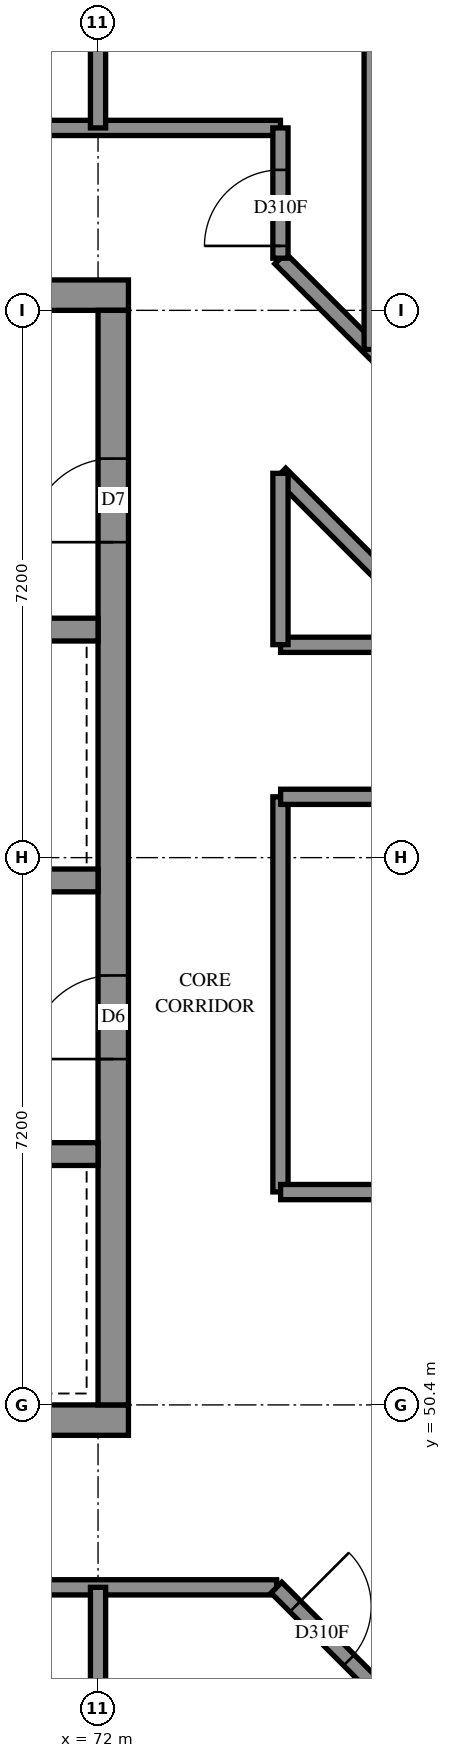
"""IFC4 building model, lengths in metres.
Left out: names, types, materials, properties, quantities, classifications, styles, units other than length and angle.
Written with IfcOpenShell. Run it as: python <this file> out.ifc"""

import sys

from ifc_helpers import new_model, si_unit, direction, frame, frame_2d, origin, place, context, subcontext, project, spatial, rectangle, extrude, element, fill, save


model = new_model("IFC4")
c1 = context("Model", 3, precision=1e-05, world=origin(), true_north=direction((0.0, 1.0)))
c2 = subcontext(c1, "Body", "Model", "MODEL_VIEW")
j1 = project(units=[si_unit("LENGTHUNIT", "METRE"), si_unit("PLANEANGLEUNIT", "RADIAN")], contexts=[c1])
p1 = place(None, origin())
s1 = spatial("IfcSite", under=j1, at=p1, CompositionType="ELEMENT")
p2 = place(p1, origin())
s2 = spatial("IfcBuilding", under=s1, at=p2, CompositionType="ELEMENT")
p3 = place(p2, frame((0.0, 0.0, 260.8)))
s3 = spatial("IfcBuildingStorey", under=s2, at=p3, CompositionType="ELEMENT", Elevation=260.8)
p4 = place(p3, frame((57.2, 50.2, -0.3), z_axis=(0.0, 0.0, 1.0), x_axis=(1.0, 0.0, 0.0)))
e1 = element("IfcWall", 1, at=p4, inside=s3, PredefinedType="SHEAR", context=c2, shape_type="SweptSolid", body=[
    extrude(rectangle(XDim=15.2, YDim=0.4, at=frame_2d((7.6, 0.0))), origin(), (0.0, 0.0, 1.0), 2.7),
])
p5 = place(p3, frame((57.2, 65.0, -0.3), z_axis=(0.0, 0.0, 1.0), x_axis=(1.0, 0.0, 0.0)))
e2 = element("IfcWall", 2, at=p5, inside=s3, PredefinedType="SHEAR", context=c2, shape_type="SweptSolid", body=[
    extrude(rectangle(XDim=15.2, YDim=0.4, at=frame_2d((7.6, 0.0))), origin(), (0.0, 0.0, 1.0), 2.7),
])
p6 = place(p5, frame((10.4, 0.0, 0.3)))
e3 = element("IfcOpeningElement", 3, at=p6, cuts=e2, PredefinedType="OPENING", context=c2, shape_type="SweptSolid", body=[
    extrude(rectangle(XDim=0.8, YDim=2.1, at=frame_2d((0.4, 1.05))), frame((0.0, 0.21, 0.0), z_axis=(0.0, -1.0, 0.0), x_axis=(1.0, 0.0, 0.0)), (0.0, 0.0, 1.0), 0.42),
])
p7 = place(p3, frame((72.2, 50.4, -0.3), z_axis=(0.0, 0.0, 1.0), x_axis=(0.0, 1.0, 0.0)))
e4 = element("IfcWall", 4, at=p7, inside=s3, PredefinedType="SHEAR", context=c2, shape_type="SweptSolid", body=[
    extrude(rectangle(XDim=14.4, YDim=0.4, at=frame_2d((7.2, 0.0))), origin(), (0.0, 0.0, 1.0), 2.7),
])
p8 = place(p7, frame((4.55, 0.0, 0.3)))
e5 = element("IfcOpeningElement", 5, at=p8, cuts=e4, PredefinedType="OPENING", context=c2, shape_type="SweptSolid", body=[
    extrude(rectangle(XDim=1.1, YDim=2.1, at=frame_2d((0.55, 1.05))), frame((0.0, 0.21, 0.0), z_axis=(0.0, -1.0, 0.0), x_axis=(1.0, 0.0, 0.0)), (0.0, 0.0, 1.0), 0.42),
])
p9 = place(p7, frame((11.35, 0.0, 0.3)))
e6 = element("IfcOpeningElement", 6, at=p9, cuts=e4, PredefinedType="OPENING", context=c2, shape_type="SweptSolid", body=[
    extrude(rectangle(XDim=1.1, YDim=2.1, at=frame_2d((0.55, 1.05))), frame((0.0, 0.21, 0.0), z_axis=(0.0, -1.0, 0.0), x_axis=(1.0, 0.0, 0.0)), (0.0, 0.0, 1.0), 0.42),
])
p10 = place(p3, frame((57.6, 53.7, 0.0), z_axis=(0.0, 0.0, 1.0), x_axis=(1.0, 0.0, 0.0)))
e7 = element("IfcWall", 7, at=p10, inside=s3, PredefinedType="SOLIDWALL", context=c2, shape_type="SweptSolid", body=[
    extrude(rectangle(XDim=14.4, YDim=0.3, at=frame_2d((7.2, 0.0))), origin(), (0.0, 0.0, 1.0), 3.1),
])
p11 = place(p10, frame((1.35, 0.0, 0.0)))
e8 = element("IfcOpeningElement", 8, at=p11, cuts=e7, PredefinedType="OPENING", context=c2, shape_type="SweptSolid", body=[
    extrude(rectangle(XDim=0.9, YDim=2.1, at=frame_2d((0.45, 1.05))), frame((0.0, 0.16, 0.0), z_axis=(0.0, -1.0, 0.0), x_axis=(1.0, 0.0, 0.0)), (0.0, 0.0, 1.0), 0.32),
])
p12 = place(p10, frame((4.95, 0.0, 0.0)))
e9 = element("IfcOpeningElement", 9, at=p12, cuts=e7, PredefinedType="OPENING", context=c2, shape_type="SweptSolid", body=[
    extrude(rectangle(XDim=0.9, YDim=2.1, at=frame_2d((0.45, 1.05))), frame((0.0, 0.16, 0.0), z_axis=(0.0, -1.0, 0.0), x_axis=(1.0, 0.0, 0.0)), (0.0, 0.0, 1.0), 0.32),
])
p13 = place(p10, frame((8.55, 0.0, 0.0)))
e10 = element("IfcOpeningElement", 10, at=p13, cuts=e7, PredefinedType="OPENING", context=c2, shape_type="SweptSolid", body=[
    extrude(rectangle(XDim=0.9, YDim=2.1, at=frame_2d((0.45, 1.05))), frame((0.0, 0.16, 0.0), z_axis=(0.0, -1.0, 0.0), x_axis=(1.0, 0.0, 0.0)), (0.0, 0.0, 1.0), 0.32),
])
p14 = place(p10, frame((12.05, 0.0, 0.0)))
e11 = element("IfcOpeningElement", 11, at=p14, cuts=e7, PredefinedType="OPENING", context=c2, shape_type="SweptSolid", body=[
    extrude(rectangle(XDim=1.1, YDim=2.1, at=frame_2d((0.55, 1.05))), frame((0.0, 0.16, 0.0), z_axis=(0.0, -1.0, 0.0), x_axis=(1.0, 0.0, 0.0)), (0.0, 0.0, 1.0), 0.32),
])
p15 = place(p3, frame((57.6, 57.3, 0.0), z_axis=(0.0, 0.0, 1.0), x_axis=(1.0, 0.0, 0.0)))
e12 = element("IfcWall", 12, at=p15, inside=s3, PredefinedType="SOLIDWALL", context=c2, shape_type="SweptSolid", body=[
    extrude(rectangle(XDim=14.4, YDim=0.3, at=frame_2d((7.2, 0.0))), origin(), (0.0, 0.0, 1.0), 3.1),
])
p16 = place(p15, frame((8.55, 0.0, 0.0)))
e13 = element("IfcOpeningElement", 13, at=p16, cuts=e12, PredefinedType="OPENING", context=c2, shape_type="SweptSolid", body=[
    extrude(rectangle(XDim=0.9, YDim=2.1, at=frame_2d((0.45, 1.05))), frame((0.0, 0.16, 0.0), z_axis=(0.0, -1.0, 0.0), x_axis=(1.0, 0.0, 0.0)), (0.0, 0.0, 1.0), 0.32),
])
p17 = place(p15, frame((1.25, 0.0, 0.0)))
e14 = element("IfcOpeningElement", 14, at=p17, cuts=e12, PredefinedType="OPENING", context=c2, shape_type="SweptSolid", body=[
    extrude(rectangle(XDim=1.1, YDim=2.1, at=frame_2d((0.55, 1.05))), frame((0.0, 0.16, 0.0), z_axis=(0.0, -1.0, 0.0), x_axis=(1.0, 0.0, 0.0)), (0.0, 0.0, 1.0), 0.32),
])
p18 = place(p15, frame((4.85, 0.0, 0.0)))
e15 = element("IfcOpeningElement", 15, at=p18, cuts=e12, PredefinedType="OPENING", context=c2, shape_type="SweptSolid", body=[
    extrude(rectangle(XDim=1.1, YDim=2.1, at=frame_2d((0.55, 1.05))), frame((0.0, 0.16, 0.0), z_axis=(0.0, -1.0, 0.0), x_axis=(1.0, 0.0, 0.0)), (0.0, 0.0, 1.0), 0.32),
])
p19 = place(p15, frame((12.05, 0.0, 0.0)))
e16 = element("IfcOpeningElement", 16, at=p19, cuts=e12, PredefinedType="OPENING", context=c2, shape_type="SweptSolid", body=[
    extrude(rectangle(XDim=1.1, YDim=2.1, at=frame_2d((0.55, 1.05))), frame((0.0, 0.16, 0.0), z_axis=(0.0, -1.0, 0.0), x_axis=(1.0, 0.0, 0.0)), (0.0, 0.0, 1.0), 0.32),
])
p20 = place(p3, frame((64.8, 60.6, 0.0), z_axis=(0.0, 0.0, 1.0), x_axis=(1.0, 0.0, 0.0)))
e17 = element("IfcWall", 17, at=p20, inside=s3, PredefinedType="SOLIDWALL", context=c2, shape_type="SweptSolid", body=[
    extrude(rectangle(XDim=7.2, YDim=0.3, at=frame_2d((3.6, 0.0))), origin(), (0.0, 0.0, 1.0), 3.1),
])
p21 = place(p3, frame((55.2, 67.2, 0.0), z_axis=(0.0, 0.0, 1.0), x_axis=(1.0, 0.0, 0.0)))
e18 = element("IfcWall", 18, at=p21, inside=s3, PredefinedType="PARTITIONING", context=c2, shape_type="SweptSolid", body=[
    extrude(rectangle(XDim=19.2, YDim=0.2, at=frame_2d((9.6, 0.0))), origin(), (0.0, 0.0, 1.0), 3.1),
])
p22 = place(p21, frame((4.475, 0.0, 0.0)))
e19 = element("IfcOpeningElement", 19, at=p22, cuts=e18, PredefinedType="OPENING", context=c2, shape_type="SweptSolid", body=[
    extrude(rectangle(XDim=1.0, YDim=2.1, at=frame_2d((0.5, 1.05))), frame((0.0, 0.11, 0.0), z_axis=(0.0, -1.0, 0.0), x_axis=(1.0, 0.0, 0.0)), (0.0, 0.0, 1.0), 0.22),
])
p23 = place(p21, frame((8.301, 0.0, 0.0)))
e20 = element("IfcOpeningElement", 20, at=p23, cuts=e18, PredefinedType="OPENING", context=c2, shape_type="SweptSolid", body=[
    extrude(rectangle(XDim=0.9, YDim=2.1, at=frame_2d((0.45, 1.05))), frame((0.0, 0.11, 0.0), z_axis=(0.0, -1.0, 0.0), x_axis=(1.0, 0.0, 0.0)), (0.0, 0.0, 1.0), 0.22),
])
p24 = place(p21, frame((13.88, 0.0, 0.0)))
e21 = element("IfcOpeningElement", 21, at=p24, cuts=e18, PredefinedType="OPENING", context=c2, shape_type="SweptSolid", body=[
    extrude(rectangle(XDim=1.0, YDim=2.1, at=frame_2d((0.5, 1.05))), frame((0.0, 0.11, 0.0), z_axis=(0.0, -1.0, 0.0), x_axis=(1.0, 0.0, 0.0)), (0.0, 0.0, 1.0), 0.22),
])
p25 = place(p3, frame((55.2, 48.0, 0.0), z_axis=(0.0, 0.0, 1.0), x_axis=(1.0, 0.0, 0.0)))
e22 = element("IfcWall", 22, at=p25, inside=s3, PredefinedType="PARTITIONING", context=c2, shape_type="SweptSolid", body=[
    extrude(rectangle(XDim=19.15, YDim=0.2, at=frame_2d((9.575, 0.0))), origin(), (0.0, 0.0, 1.0), 3.1),
])
p26 = place(p25, frame((6.343, 0.0, 0.0)))
e23 = element("IfcOpeningElement", 23, at=p26, cuts=e22, PredefinedType="OPENING", context=c2, shape_type="SweptSolid", body=[
    extrude(rectangle(XDim=0.9, YDim=2.1, at=frame_2d((0.45, 1.05))), frame((0.0, 0.11, 0.0), z_axis=(0.0, -1.0, 0.0), x_axis=(1.0, 0.0, 0.0)), (0.0, 0.0, 1.0), 0.22),
])
p27 = place(p25, frame((11.633, 0.0, 0.0)))
e24 = element("IfcOpeningElement", 24, at=p27, cuts=e22, PredefinedType="OPENING", context=c2, shape_type="SweptSolid", body=[
    extrude(rectangle(XDim=1.0, YDim=2.1, at=frame_2d((0.5, 1.05))), frame((0.0, 0.11, 0.0), z_axis=(0.0, -1.0, 0.0), x_axis=(1.0, 0.0, 0.0)), (0.0, 0.0, 1.0), 0.22),
])
p28 = place(p25, frame((13.707, 0.0, 0.0)))
e25 = element("IfcOpeningElement", 25, at=p28, cuts=e22, PredefinedType="OPENING", context=c2, shape_type="SweptSolid", body=[
    extrude(rectangle(XDim=1.0, YDim=2.1, at=frame_2d((0.5, 1.05))), frame((0.0, 0.11, 0.0), z_axis=(0.0, -1.0, 0.0), x_axis=(1.0, 0.0, 0.0)), (0.0, 0.0, 1.0), 0.22),
])
p29 = place(p3, frame((74.397, 65.483, 0.0), z_axis=(0.0, 0.0, 1.0), x_axis=(0.7071067812, -0.7071067812, 0.0)))
e26 = element("IfcWall", 26, at=p29, inside=s3, PredefinedType="PARTITIONING", context=c2, shape_type="SweptSolid", body=[
    extrude(rectangle(XDim=10.788, YDim=0.2, at=frame_2d((5.394, 0.0))), origin(), (0.0, 0.0, 1.0), 3.1),
])
p30 = place(p29, frame((5.083, 0.0, 0.0)))
e27 = element("IfcOpeningElement", 27, at=p30, cuts=e26, PredefinedType="OPENING", context=c2, shape_type="SweptSolid", body=[
    extrude(rectangle(XDim=1.0, YDim=2.1, at=frame_2d((0.5, 1.05))), frame((0.0, 0.11, 0.0), z_axis=(0.0, -1.0, 0.0), x_axis=(1.0, 0.0, 0.0)), (0.0, 0.0, 1.0), 0.22),
])
p31 = place(p29, frame((7.858, 0.0, 0.0)))
e28 = element("IfcOpeningElement", 28, at=p31, cuts=e26, PredefinedType="OPENING", context=c2, shape_type="SweptSolid", body=[
    extrude(rectangle(XDim=1.0, YDim=2.1, at=frame_2d((0.5, 1.05))), frame((0.0, 0.11, 0.0), z_axis=(0.0, -1.0, 0.0), x_axis=(1.0, 0.0, 0.0)), (0.0, 0.0, 1.0), 0.22),
])
p32 = place(p3, frame((75.6, 64.286, 0.0), z_axis=(0.0, 0.0, 1.0), x_axis=(0.0, 1.0, 0.0)))
e29 = element("IfcWall", 29, at=p32, inside=s3, PredefinedType="PARTITIONING", context=c2, shape_type="SweptSolid", body=[
    extrude(rectangle(XDim=8.544, YDim=0.2, at=frame_2d((4.272, 0.0))), origin(), (0.0, 0.0, 1.0), 3.1),
])
p33 = place(p3, frame((74.4, 53.202, 0.0), z_axis=(0.0, 0.0, 1.0), x_axis=(0.0, 1.0, 0.0)))
e30 = element("IfcWall", 30, at=p33, inside=s3, PredefinedType="PARTITIONING", context=c2, shape_type="SweptSolid", body=[
    extrude(rectangle(XDim=5.198, YDim=0.2, at=frame_2d((2.599, 0.0))), origin(), (0.0, 0.0, 1.0), 3.1),
])
p34 = place(p3, frame((74.347, 47.997, 0.0), z_axis=(0.0, 0.0, 1.0), x_axis=(0.7071067812, -0.7071067812, 0.0)))
e31 = element("IfcWall", 31, at=p34, inside=s3, PredefinedType="PARTITIONING", context=c2, shape_type="SweptSolid", body=[
    extrude(rectangle(XDim=4.596, YDim=0.2, at=frame_2d((2.298, 0.0))), origin(), (0.0, 0.0, 1.0), 3.1),
])
p35 = place(p34, frame((0.35, 0.0, 0.0)))
e32 = element("IfcOpeningElement", 32, at=p35, cuts=e31, PredefinedType="OPENING", context=c2, shape_type="SweptSolid", body=[
    extrude(rectangle(XDim=1.0, YDim=2.1, at=frame_2d((0.5, 1.05))), frame((0.0, 0.11, 0.0), z_axis=(0.0, -1.0, 0.0), x_axis=(1.0, 0.0, 0.0)), (0.0, 0.0, 1.0), 0.22),
])
p36 = place(p3, frame((72.0, 43.55, 0.0), z_axis=(0.0, 0.0, 1.0), x_axis=(0.0, 1.0, 0.0)))
e33 = element("IfcWall", 33, at=p36, inside=s3, PredefinedType="PARTITIONING", context=c2, shape_type="SweptSolid", body=[
    extrude(rectangle(XDim=4.45, YDim=0.2, at=frame_2d((2.225, 0.0))), origin(), (0.0, 0.0, 1.0), 3.1),
])
p37 = place(p3, frame((72.0, 67.2, 0.0), z_axis=(0.0, 0.0, 1.0), x_axis=(0.0, 1.0, 0.0)))
e34 = element("IfcWall", 34, at=p37, inside=s3, PredefinedType="PARTITIONING", context=c2, shape_type="SweptSolid", body=[
    extrude(rectangle(XDim=4.346, YDim=0.2, at=frame_2d((2.173, 0.0))), origin(), (0.0, 0.0, 1.0), 3.1),
])
p38 = place(p3, frame((74.402, 58.4, 0.0), z_axis=(0.0, 0.0, 1.0), x_axis=(1.0, 0.0, 0.0)))
e35 = element("IfcWall", 35, at=p38, inside=s3, PredefinedType="PARTITIONING", context=c2, shape_type="SweptSolid", body=[
    extrude(rectangle(XDim=4.256, YDim=0.2, at=frame_2d((2.128, 0.0))), origin(), (0.0, 0.0, 1.0), 3.1),
])
p39 = place(p38, frame((1.331, 0.0, 0.0)))
e36 = element("IfcOpeningElement", 36, at=p39, cuts=e35, PredefinedType="OPENING", context=c2, shape_type="SweptSolid", body=[
    extrude(rectangle(XDim=1.0, YDim=2.1, at=frame_2d((0.5, 1.05))), frame((0.0, 0.11, 0.0), z_axis=(0.0, -1.0, 0.0), x_axis=(1.0, 0.0, 0.0)), (0.0, 0.0, 1.0), 0.22),
])
p40 = place(p3, frame((74.399, 62.653, 0.0), z_axis=(0.0, 0.0, 1.0), x_axis=(0.7071067812, -0.7071067812, 0.0)))
e37 = element("IfcWall", 37, at=p40, inside=s3, PredefinedType="PARTITIONING", context=c2, shape_type="SweptSolid", body=[
    extrude(rectangle(XDim=3.188, YDim=0.2, at=frame_2d((1.594, 0.0))), origin(), (0.0, 0.0, 1.0), 3.1),
])
p41 = place(p3, frame((74.402, 53.2, 0.0), z_axis=(0.0, 0.0, 1.0), x_axis=(1.0, 0.0, 0.0)))
e38 = element("IfcWall", 38, at=p41, inside=s3, PredefinedType="PARTITIONING", context=c2, shape_type="SweptSolid", body=[
    extrude(rectangle(XDim=2.968, YDim=0.2, at=frame_2d((1.484, 0.0))), origin(), (0.0, 0.0, 1.0), 3.1),
])
for number, where, z_axis, x_axis in (
    (39, (74.402, 60.4, 0.0), (0.0, 0.0, 1.0), (1.0, 0.0, 0.0)),
    (40, (74.4, 60.402, 0.0), (0.0, 0.0, 1.0), (0.0, 1.0, 0.0)),
):
    element("IfcWall", number, at=place(p3, frame(where, z_axis=z_axis, x_axis=x_axis)), inside=s3, PredefinedType="PARTITIONING", context=c2, shape_type="SweptSolid", body=[
        extrude(rectangle(XDim=2.254, YDim=0.2, at=frame_2d((1.127, 0.0))), origin(), (0.0, 0.0, 1.0), 3.1),
    ])
p42 = place(p3, frame((74.4, 65.486, 0.0), z_axis=(0.0, 0.0, 1.0), x_axis=(0.0, 1.0, 0.0)))
e41 = element("IfcWall", 41, at=p42, inside=s3, PredefinedType="PARTITIONING", context=c2, shape_type="SweptSolid", body=[
    extrude(rectangle(XDim=1.714, YDim=0.2, at=frame_2d((0.857, 0.0))), origin(), (0.0, 0.0, 1.0), 3.1),
])
p43 = place(p42, frame((0.162, 0.0, 0.0)))
e42 = element("IfcOpeningElement", 42, at=p43, cuts=e41, PredefinedType="OPENING", context=c2, shape_type="SweptSolid", body=[
    extrude(rectangle(XDim=1.0, YDim=2.1, at=frame_2d((0.5, 1.05))), frame((0.0, 0.11, 0.0), z_axis=(0.0, -1.0, 0.0), x_axis=(1.0, 0.0, 0.0)), (0.0, 0.0, 1.0), 0.22),
])
p44 = place(p8, origin())
e43 = element("IfcDoor", 43, at=p44, inside=s3, OperationType="DOUBLE_DOOR_SINGLE_SWING", PredefinedType="DOOR", context=c2, shape_type="SweptSolid", body=[
    extrude(rectangle(XDim=1.1, YDim=2.1, at=frame_2d((0.55, 1.05))), frame((0.0, 0.025, 0.0), z_axis=(0.0, -1.0, 0.0), x_axis=(1.0, 0.0, 0.0)), (0.0, 0.0, 1.0), 0.05),
])
fill(e5, e43)
p45 = place(p9, origin())
e44 = element("IfcDoor", 44, at=p45, inside=s3, OperationType="SINGLE_SWING_RIGHT", PredefinedType="DOOR", context=c2, shape_type="SweptSolid", body=[
    extrude(rectangle(XDim=1.1, YDim=2.1, at=frame_2d((0.55, 1.05))), frame((0.0, 0.025, 0.0), z_axis=(0.0, -1.0, 0.0), x_axis=(1.0, 0.0, 0.0)), (0.0, 0.0, 1.0), 0.05),
])
fill(e6, e44)
p46 = place(p35, origin())
e45 = element("IfcDoor", 45, at=p46, inside=s3, OperationType="SINGLE_SWING_LEFT", PredefinedType="DOOR", context=c2, shape_type="SweptSolid", body=[
    extrude(rectangle(XDim=1.0, YDim=2.1, at=frame_2d((0.5, 1.05))), frame((0.0, 0.025, 0.0), z_axis=(0.0, -1.0, 0.0), x_axis=(1.0, 0.0, 0.0)), (0.0, 0.0, 1.0), 0.05),
])
fill(e32, e45)
p47 = place(p43, origin())
e46 = element("IfcDoor", 46, at=p47, inside=s3, OperationType="SINGLE_SWING_RIGHT", PredefinedType="DOOR", context=c2, shape_type="SweptSolid", body=[
    extrude(rectangle(XDim=1.0, YDim=2.1, at=frame_2d((0.5, 1.05))), frame((0.0, 0.025, 0.0), z_axis=(0.0, -1.0, 0.0), x_axis=(1.0, 0.0, 0.0)), (0.0, 0.0, 1.0), 0.05),
])
fill(e42, e46)
save(model, sys.argv[1])
